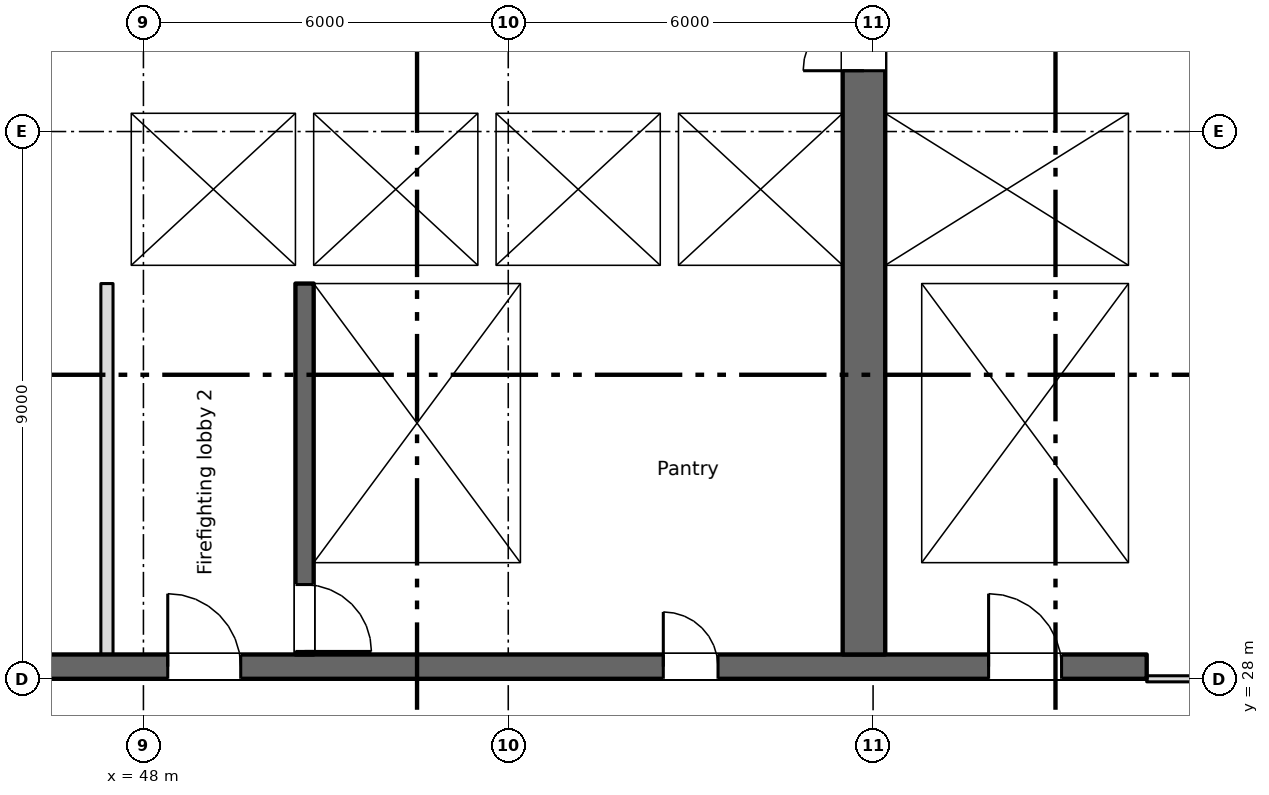
"""IFC4 building model, lengths in metres.
Left out: names, types, materials, properties, quantities, classifications, styles, units other than length and angle.
Written with IfcOpenShell. Run it as: python <this file> out.ifc"""

import sys

from ifc_helpers import new_model, si_unit, direction, frame, frame_2d, origin, place, context, subcontext, project, spatial, rectangle, extrude, element, fill, save


model = new_model("IFC4")
c1 = context("Model", 3, precision=1e-05, world=origin(), true_north=direction((0.0, 1.0)))
c2 = subcontext(c1, "Body", "Model", "MODEL_VIEW")
j1 = project(units=[si_unit("LENGTHUNIT", "METRE"), si_unit("PLANEANGLEUNIT", "RADIAN")], contexts=[c1])
p1 = place(None, origin())
s1 = spatial("IfcSite", under=j1, at=p1, CompositionType="ELEMENT")
p2 = place(p1, origin())
s2 = spatial("IfcBuilding", under=s1, at=p2, CompositionType="ELEMENT")
p3 = place(p2, frame((0.0, 0.0, 166.75)))
s3 = spatial("IfcBuildingStorey", under=s2, at=p3, CompositionType="ELEMENT", Elevation=166.75)
p4 = place(p3, frame((6.6, 28.2, 0.0), z_axis=(0.0, 0.0, 1.0), x_axis=(1.0, 0.0, 0.0)))
e1 = element("IfcWall", 1, at=p4, inside=s3, PredefinedType="SHEAR", context=c2, shape_type="SweptSolid", body=[
    extrude(rectangle(XDim=57.9, YDim=0.4, at=frame_2d((28.95, 0.0))), origin(), (0.0, 0.0, 1.0), 3.35),
])
p5 = place(p4, frame((12.663, 0.0, 0.0)))
e2 = element("IfcOpeningElement", 2, at=p5, cuts=e1, PredefinedType="OPENING", context=c2, shape_type="SweptSolid", body=[
    extrude(rectangle(XDim=0.9, YDim=2.1, at=frame_2d((0.45, 1.05))), frame((0.0, 0.21, 0.0), z_axis=(0.0, -1.0, 0.0), x_axis=(1.0, 0.0, 0.0)), (0.0, 0.0, 1.0), 0.42),
])
p6 = place(p4, frame((15.238, 0.0, 0.0)))
e3 = element("IfcOpeningElement", 3, at=p6, cuts=e1, PredefinedType="OPENING", context=c2, shape_type="SweptSolid", body=[
    extrude(rectangle(XDim=0.9, YDim=2.1, at=frame_2d((0.45, 1.05))), frame((0.0, 0.21, 0.0), z_axis=(0.0, -1.0, 0.0), x_axis=(1.0, 0.0, 0.0)), (0.0, 0.0, 1.0), 0.42),
])
p7 = place(p4, frame((49.95, 0.0, 0.0)))
e4 = element("IfcOpeningElement", 4, at=p7, cuts=e1, PredefinedType="OPENING", context=c2, shape_type="SweptSolid", body=[
    extrude(rectangle(XDim=0.9, YDim=2.1, at=frame_2d((0.45, 1.05))), frame((0.0, 0.21, 0.0), z_axis=(0.0, -1.0, 0.0), x_axis=(1.0, 0.0, 0.0)), (0.0, 0.0, 1.0), 0.42),
])
p8 = place(p4, frame((0.663, 0.0, 0.0)))
e5 = element("IfcOpeningElement", 5, at=p8, cuts=e1, PredefinedType="OPENING", context=c2, shape_type="SweptSolid", body=[
    extrude(rectangle(XDim=0.9, YDim=2.1, at=frame_2d((0.45, 1.05))), frame((0.0, 0.21, 0.0), z_axis=(0.0, -1.0, 0.0), x_axis=(1.0, 0.0, 0.0)), (0.0, 0.0, 1.0), 0.42),
])
p9 = place(p4, frame((2.238, 0.0, 0.0)))
e6 = element("IfcOpeningElement", 6, at=p9, cuts=e1, PredefinedType="OPENING", context=c2, shape_type="SweptSolid", body=[
    extrude(rectangle(XDim=0.9, YDim=2.1, at=frame_2d((0.45, 1.05))), frame((0.0, 0.21, 0.0), z_axis=(0.0, -1.0, 0.0), x_axis=(1.0, 0.0, 0.0)), (0.0, 0.0, 1.0), 0.42),
])
p10 = place(p4, frame((4.8, 0.0, 0.0)))
e7 = element("IfcOpeningElement", 7, at=p10, cuts=e1, PredefinedType="OPENING", context=c2, shape_type="SweptSolid", body=[
    extrude(rectangle(XDim=1.2, YDim=2.1, at=frame_2d((0.6, 1.05))), frame((0.0, 0.21, 0.0), z_axis=(0.0, -1.0, 0.0), x_axis=(1.0, 0.0, 0.0)), (0.0, 0.0, 1.0), 0.42),
])
p11 = place(p4, frame((31.8, 0.0, 0.0)))
e8 = element("IfcOpeningElement", 8, at=p11, cuts=e1, PredefinedType="OPENING", context=c2, shape_type="SweptSolid", body=[
    extrude(rectangle(XDim=1.2, YDim=2.1, at=frame_2d((0.6, 1.05))), frame((0.0, 0.21, 0.0), z_axis=(0.0, -1.0, 0.0), x_axis=(1.0, 0.0, 0.0)), (0.0, 0.0, 1.0), 0.42),
])
p12 = place(p4, frame((55.3, 0.0, 0.0)))
e9 = element("IfcOpeningElement", 9, at=p12, cuts=e1, PredefinedType="OPENING", context=c2, shape_type="SweptSolid", body=[
    extrude(rectangle(XDim=1.2, YDim=2.1, at=frame_2d((0.6, 1.05))), frame((0.0, 0.21, 0.0), z_axis=(0.0, -1.0, 0.0), x_axis=(1.0, 0.0, 0.0)), (0.0, 0.0, 1.0), 0.42),
])
p13 = place(p4, frame((21.8, 0.0, 0.0)))
e10 = element("IfcOpeningElement", 10, at=p13, cuts=e1, PredefinedType="OPENING", context=c2, shape_type="SweptSolid", body=[
    extrude(rectangle(XDim=1.2, YDim=2.1, at=frame_2d((0.6, 1.05))), frame((0.0, 0.21, 0.0), z_axis=(0.0, -1.0, 0.0), x_axis=(1.0, 0.0, 0.0)), (0.0, 0.0, 1.0), 0.42),
])
p14 = place(p4, frame((41.8, 0.0, 0.0)))
e11 = element("IfcOpeningElement", 11, at=p14, cuts=e1, PredefinedType="OPENING", context=c2, shape_type="SweptSolid", body=[
    extrude(rectangle(XDim=1.2, YDim=2.1, at=frame_2d((0.6, 1.05))), frame((0.0, 0.21, 0.0), z_axis=(0.0, -1.0, 0.0), x_axis=(1.0, 0.0, 0.0)), (0.0, 0.0, 1.0), 0.42),
])
p15 = place(p4, frame((24.95, 0.0, 0.0)))
e12 = element("IfcOpeningElement", 12, at=p15, cuts=e1, PredefinedType="OPENING", context=c2, shape_type="SweptSolid", body=[
    extrude(rectangle(XDim=2.4, YDim=2.1, at=frame_2d((1.2, 1.05))), frame((0.0, 0.21, 0.0), z_axis=(0.0, -1.0, 0.0), x_axis=(1.0, 0.0, 0.0)), (0.0, 0.0, 1.0), 0.42),
])
p16 = place(p4, frame((37.45, 0.0, 0.0)))
e13 = element("IfcOpeningElement", 13, at=p16, cuts=e1, PredefinedType="OPENING", context=c2, shape_type="SweptSolid", body=[
    extrude(rectangle(XDim=2.4, YDim=2.1, at=frame_2d((1.2, 1.05))), frame((0.0, 0.21, 0.0), z_axis=(0.0, -1.0, 0.0), x_axis=(1.0, 0.0, 0.0)), (0.0, 0.0, 1.0), 0.42),
])
p17 = place(p4, frame((8.1, 0.0, 0.0)))
e14 = element("IfcOpeningElement", 14, at=p17, cuts=e1, PredefinedType="OPENING", context=c2, shape_type="SweptSolid", body=[
    extrude(rectangle(XDim=2.4, YDim=2.1, at=frame_2d((1.2, 1.05))), frame((0.0, 0.21, 0.0), z_axis=(0.0, -1.0, 0.0), x_axis=(1.0, 0.0, 0.0)), (0.0, 0.0, 1.0), 0.42),
])
p18 = place(p4, frame((28.95, 0.0, 0.0)))
e15 = element("IfcOpeningElement", 15, at=p18, cuts=e1, PredefinedType="OPENING", context=c2, shape_type="SweptSolid", body=[
    extrude(rectangle(XDim=0.9, YDim=2.1, at=frame_2d((0.45, 1.05))), frame((0.0, 0.21, 0.0), z_axis=(0.0, -1.0, 0.0), x_axis=(1.0, 0.0, 0.0)), (0.0, 0.0, 1.0), 0.42),
])
p19 = place(p4, frame((34.95, 0.0, 0.0)))
e16 = element("IfcOpeningElement", 16, at=p19, cuts=e1, PredefinedType="OPENING", context=c2, shape_type="SweptSolid", body=[
    extrude(rectangle(XDim=0.9, YDim=2.1, at=frame_2d((0.45, 1.05))), frame((0.0, 0.21, 0.0), z_axis=(0.0, -1.0, 0.0), x_axis=(1.0, 0.0, 0.0)), (0.0, 0.0, 1.0), 0.42),
])
p20 = place(p3, frame((64.35, 34.8, 0.0), z_axis=(0.0, 0.0, 1.0), x_axis=(0.0, 1.0, 0.0)))
e17 = element("IfcWall", 17, at=p20, inside=s3, PredefinedType="SHEAR", context=c2, shape_type="SweptSolid", body=[
    extrude(rectangle(XDim=10.5, YDim=0.3, at=frame_2d((5.25, 0.0))), origin(), (0.0, 0.0, 1.0), 3.35),
])
p21 = place(p3, frame((59.85, 28.4, 0.0), z_axis=(0.0, 0.0, 1.0), x_axis=(0.0, 1.0, 0.0)))
e18 = element("IfcWall", 18, at=p21, inside=s3, PredefinedType="SHEAR", context=c2, shape_type="SweptSolid", body=[
    extrude(rectangle(XDim=16.9, YDim=0.7, at=frame_2d((8.45, 0.0))), origin(), (0.0, 0.0, 1.0), 3.35),
])
p22 = place(p21, frame((9.6, 0.0, 0.0)))
e19 = element("IfcOpeningElement", 19, at=p22, cuts=e18, PredefinedType="OPENING", context=c2, shape_type="SweptSolid", body=[
    extrude(rectangle(XDim=2.0, YDim=2.1, at=frame_2d((1.0, 1.05))), frame((0.0, 0.36, 0.0), z_axis=(0.0, -1.0, 0.0), x_axis=(1.0, 0.0, 0.0)), (0.0, 0.0, 1.0), 0.72),
])
p23 = place(p21, frame((15.4, 0.0, 0.0)))
e20 = element("IfcOpeningElement", 20, at=p23, cuts=e18, PredefinedType="OPENING", context=c2, shape_type="SweptSolid", body=[
    extrude(rectangle(XDim=1.2, YDim=2.1, at=frame_2d((0.6, 1.05))), frame((0.0, 0.36, 0.0), z_axis=(0.0, -1.0, 0.0), x_axis=(1.0, 0.0, 0.0)), (0.0, 0.0, 1.0), 0.72),
])
p24 = place(p3, frame((50.65, 34.5, 0.0), z_axis=(0.0, 0.0, 1.0), x_axis=(0.0, -1.0, 0.0)))
e21 = element("IfcWall", 21, at=p24, inside=s3, PredefinedType="SHEAR", context=c2, shape_type="SweptSolid", body=[
    extrude(rectangle(XDim=6.1, YDim=0.3, at=frame_2d((3.05, 0.0))), origin(), (0.0, 0.0, 1.0), 3.35),
])
p25 = place(p24, frame((4.95, 0.0, 0.0)))
e22 = element("IfcOpeningElement", 22, at=p25, cuts=e21, PredefinedType="OPENING", context=c2, shape_type="SweptSolid", body=[
    extrude(rectangle(XDim=1.1, YDim=2.1, at=frame_2d((0.55, 1.05))), frame((0.0, 0.16, 0.0), z_axis=(0.0, -1.0, 0.0), x_axis=(1.0, 0.0, 0.0)), (0.0, 0.0, 1.0), 0.32),
])
p26 = place(p3, frame((54.35, 28.4, 0.0), z_axis=(0.0, 0.0, 1.0), x_axis=(0.0, 1.0, 0.0)))
e23 = element("IfcWall", 23, at=p26, inside=s3, PredefinedType="SHEAR", context=c2, shape_type="SweptSolid", body=[
    extrude(rectangle(XDim=6.1, YDim=0.3, at=frame_2d((3.05, 0.0))), origin(), (0.0, 0.0, 1.0), 3.35),
])
p27 = place(p3, frame((60.5, 28.4, 0.0), z_axis=(0.0, 0.0, 1.0), x_axis=(0.0, 1.0, 0.0)))
e24 = element("IfcWall", 24, at=p27, inside=s3, PredefinedType="SHEAR", context=c2, shape_type="SweptSolid", body=[
    extrude(rectangle(XDim=6.1, YDim=0.6, at=frame_2d((3.05, 0.0))), origin(), (0.0, 0.0, 1.0), 3.35),
])
p28 = place(p3, frame((64.35, 28.4, 0.0), z_axis=(0.0, 0.0, 1.0), x_axis=(0.0, 1.0, 0.0)))
e25 = element("IfcWall", 25, at=p28, inside=s3, PredefinedType="SHEAR", context=c2, shape_type="SweptSolid", body=[
    extrude(rectangle(XDim=6.1, YDim=0.3, at=frame_2d((3.05, 0.0))), origin(), (0.0, 0.0, 1.0), 3.35),
])
p29 = place(p3, frame((47.3, 34.65, 0.0), z_axis=(0.0, 0.0, 1.0), x_axis=(1.0, 0.0, 0.0)))
e26 = element("IfcWall", 26, at=p29, inside=s3, PredefinedType="SHEAR", context=c2, shape_type="SweptSolid", body=[
    extrude(rectangle(XDim=12.2, YDim=0.3, at=frame_2d((6.1, 0.0))), origin(), (0.0, 0.0, 1.0), 3.35),
])
p30 = place(p29, frame((1.3, 0.0, 0.0)))
e27 = element("IfcOpeningElement", 27, at=p30, cuts=e26, PredefinedType="OPENING", context=c2, shape_type="SweptSolid", body=[
    extrude(rectangle(XDim=1.1, YDim=2.1, at=frame_2d((0.55, 1.05))), frame((0.0, 0.16, 0.0), z_axis=(0.0, -1.0, 0.0), x_axis=(1.0, 0.0, 0.0)), (0.0, 0.0, 1.0), 0.32),
])
p31 = place(p3, frame((60.2, 34.65, 0.0), z_axis=(0.0, 0.0, 1.0), x_axis=(1.0, 0.0, 0.0)))
e28 = element("IfcWall", 28, at=p31, inside=s3, PredefinedType="SHEAR", context=c2, shape_type="SweptSolid", body=[
    extrude(rectangle(XDim=4.3, YDim=0.3, at=frame_2d((2.15, 0.0))), origin(), (0.0, 0.0, 1.0), 3.35),
])
p32 = place(p3, frame((47.3, 37.45, 0.0), z_axis=(0.0, 0.0, 1.0), x_axis=(1.0, 0.0, 0.0)))
e29 = element("IfcWall", 29, at=p32, inside=s3, PredefinedType="SHEAR", context=c2, shape_type="SweptSolid", body=[
    extrude(rectangle(XDim=12.2, YDim=0.3, at=frame_2d((6.1, 0.0))), origin(), (0.0, 0.0, 1.0), 3.35),
])
p33 = place(p32, frame((4.3, 0.0, 0.0)))
e30 = element("IfcOpeningElement", 30, at=p33, cuts=e29, PredefinedType="OPENING", context=c2, shape_type="SweptSolid", body=[
    extrude(rectangle(XDim=1.1, YDim=2.1, at=frame_2d((0.55, 1.05))), frame((0.0, 0.16, 0.0), z_axis=(0.0, -1.0, 0.0), x_axis=(1.0, 0.0, 0.0)), (0.0, 0.0, 1.0), 0.32),
])
p34 = place(p32, frame((7.3, 0.0, 0.0)))
e31 = element("IfcOpeningElement", 31, at=p34, cuts=e29, PredefinedType="OPENING", context=c2, shape_type="SweptSolid", body=[
    extrude(rectangle(XDim=1.1, YDim=2.1, at=frame_2d((0.55, 1.05))), frame((0.0, 0.16, 0.0), z_axis=(0.0, -1.0, 0.0), x_axis=(1.0, 0.0, 0.0)), (0.0, 0.0, 1.0), 0.32),
])
p35 = place(p32, frame((10.3, 0.0, 0.0)))
e32 = element("IfcOpeningElement", 32, at=p35, cuts=e29, PredefinedType="OPENING", context=c2, shape_type="SweptSolid", body=[
    extrude(rectangle(XDim=1.1, YDim=2.1, at=frame_2d((0.55, 1.05))), frame((0.0, 0.16, 0.0), z_axis=(0.0, -1.0, 0.0), x_axis=(1.0, 0.0, 0.0)), (0.0, 0.0, 1.0), 0.32),
])
p36 = place(p3, frame((60.2, 37.45, 0.0), z_axis=(0.0, 0.0, 1.0), x_axis=(1.0, 0.0, 0.0)))
e33 = element("IfcWall", 33, at=p36, inside=s3, PredefinedType="SHEAR", context=c2, shape_type="SweptSolid", body=[
    extrude(rectangle(XDim=4.0, YDim=0.3, at=frame_2d((2.0, 0.0))), origin(), (0.0, 0.0, 1.0), 3.35),
])
p37 = place(p36, frame((1.45, 0.0, 0.0)))
e34 = element("IfcOpeningElement", 34, at=p37, cuts=e33, PredefinedType="OPENING", context=c2, shape_type="SweptSolid", body=[
    extrude(rectangle(XDim=1.1, YDim=2.1, at=frame_2d((0.55, 1.05))), frame((0.0, 0.16, 0.0), z_axis=(0.0, -1.0, 0.0), x_axis=(1.0, 0.0, 0.0)), (0.0, 0.0, 1.0), 0.32),
])
p38 = place(p3, frame((47.55, 34.8, 0.0), z_axis=(0.0, 0.0, 1.0), x_axis=(0.0, 1.0, 0.0)))
e35 = element("IfcWall", 35, at=p38, inside=s3, PredefinedType="SHEAR", context=c2, shape_type="SweptSolid", body=[
    extrude(rectangle(XDim=2.5, YDim=0.5, at=frame_2d((1.25, 0.0))), origin(), (0.0, 0.0, 1.0), 3.35),
])
for number, where, z_axis, x_axis in (
    (36, (50.65, 34.8, 0.0), (0.0, 0.0, 1.0), (0.0, 1.0, 0.0)),
    (37, (53.65, 34.8, 0.0), (0.0, 0.0, 1.0), (0.0, 1.0, 0.0)),
    (38, (56.65, 34.8, 0.0), (0.0, 0.0, 1.0), (0.0, 1.0, 0.0)),
):
    element("IfcWall", number, at=place(p3, frame(where, z_axis=z_axis, x_axis=x_axis)), inside=s3, PredefinedType="SHEAR", context=c2, shape_type="SweptSolid", body=[
        extrude(rectangle(XDim=2.5, YDim=0.3, at=frame_2d((1.25, 0.0))), origin(), (0.0, 0.0, 1.0), 3.35),
    ])
p39 = place(p3, frame((47.4, 28.4, 0.0), z_axis=(0.0, 0.0, 1.0), x_axis=(0.0, 1.0, 0.0)))
e39 = element("IfcWall", 39, at=p39, inside=s3, PredefinedType="PARTITIONING", context=c2, shape_type="SweptSolid", body=[
    extrude(rectangle(XDim=6.1, YDim=0.2, at=frame_2d((3.05, 0.0))), origin(), (0.0, 0.0, 1.0), 3.35),
])
p40 = place(p3, frame((64.5, 28.0, 0.0), z_axis=(0.0, 0.0, 1.0), x_axis=(1.0, 0.0, 0.0)))
e40 = element("IfcWall", 40, at=p40, inside=s3, PredefinedType="PARTITIONING", context=c2, shape_type="SweptSolid", body=[
    extrude(rectangle(XDim=6.9, YDim=0.1, at=frame_2d((3.45, 0.0))), origin(), (0.0, 0.0, 1.0), 3.35),
])
p41 = place(p40, frame((2.55, 0.0, 0.0)))
e41 = element("IfcOpeningElement", 41, at=p41, cuts=e40, PredefinedType="OPENING", context=c2, shape_type="SweptSolid", body=[
    extrude(rectangle(XDim=1.8, YDim=2.1, at=frame_2d((0.9, 1.05))), frame((0.0, 0.06, 0.0), z_axis=(0.0, -1.0, 0.0), x_axis=(1.0, 0.0, 0.0)), (0.0, 0.0, 1.0), 0.12),
])
p42 = place(p7, origin())
e42 = element("IfcDoor", 42, at=p42, inside=s3, OperationType="SINGLE_SWING_LEFT", PredefinedType="DOOR", context=c2, shape_type="SweptSolid", body=[
    extrude(rectangle(XDim=0.9, YDim=2.1, at=frame_2d((0.45, 1.05))), frame((0.0, 0.025, 0.0), z_axis=(0.0, -1.0, 0.0), x_axis=(1.0, 0.0, 0.0)), (0.0, 0.0, 1.0), 0.05),
])
fill(e4, e42)
p43 = place(p33, origin())
e43 = element("IfcDoor", 43, at=p43, inside=s3, OperationType="SLIDING_TO_LEFT", PredefinedType="DOOR", context=c2, shape_type="SweptSolid", body=[
    extrude(rectangle(XDim=1.1, YDim=2.1, at=frame_2d((0.55, 1.05))), frame((0.0, 0.025, 0.0), z_axis=(0.0, -1.0, 0.0), x_axis=(1.0, 0.0, 0.0)), (0.0, 0.0, 1.0), 0.05),
])
fill(e30, e43)
p44 = place(p34, origin())
e44 = element("IfcDoor", 44, at=p44, inside=s3, OperationType="SLIDING_TO_LEFT", PredefinedType="DOOR", context=c2, shape_type="SweptSolid", body=[
    extrude(rectangle(XDim=1.1, YDim=2.1, at=frame_2d((0.55, 1.05))), frame((0.0, 0.025, 0.0), z_axis=(0.0, -1.0, 0.0), x_axis=(1.0, 0.0, 0.0)), (0.0, 0.0, 1.0), 0.05),
])
fill(e31, e44)
p45 = place(p35, origin())
e45 = element("IfcDoor", 45, at=p45, inside=s3, OperationType="SLIDING_TO_LEFT", PredefinedType="DOOR", context=c2, shape_type="SweptSolid", body=[
    extrude(rectangle(XDim=1.1, YDim=2.1, at=frame_2d((0.55, 1.05))), frame((0.0, 0.025, 0.0), z_axis=(0.0, -1.0, 0.0), x_axis=(1.0, 0.0, 0.0)), (0.0, 0.0, 1.0), 0.05),
])
fill(e32, e45)
p46 = place(p37, origin())
e46 = element("IfcDoor", 46, at=p46, inside=s3, OperationType="SLIDING_TO_LEFT", PredefinedType="DOOR", context=c2, shape_type="SweptSolid", body=[
    extrude(rectangle(XDim=1.1, YDim=2.1, at=frame_2d((0.55, 1.05))), frame((0.0, 0.025, 0.0), z_axis=(0.0, -1.0, 0.0), x_axis=(1.0, 0.0, 0.0)), (0.0, 0.0, 1.0), 0.05),
])
fill(e34, e46)
p47 = place(p30, origin())
e47 = element("IfcDoor", 47, at=p47, inside=s3, OperationType="SLIDING_TO_LEFT", PredefinedType="DOOR", context=c2, shape_type="SweptSolid", body=[
    extrude(rectangle(XDim=1.1, YDim=2.1, at=frame_2d((0.55, 1.05))), frame((0.0, 0.025, 0.0), z_axis=(0.0, -1.0, 0.0), x_axis=(1.0, 0.0, 0.0)), (0.0, 0.0, 1.0), 0.05),
])
fill(e27, e47)
p48 = place(p25, origin())
e48 = element("IfcDoor", 48, at=p48, inside=s3, OperationType="SINGLE_SWING_RIGHT", PredefinedType="DOOR", context=c2, shape_type="SweptSolid", body=[
    extrude(rectangle(XDim=1.1, YDim=2.1, at=frame_2d((0.55, 1.05))), frame((0.0, 0.025, 0.0), z_axis=(0.0, -1.0, 0.0), x_axis=(1.0, 0.0, 0.0)), (0.0, 0.0, 1.0), 0.05),
])
fill(e22, e48)
p49 = place(p12, origin())
e49 = element("IfcDoor", 49, at=p49, inside=s3, OperationType="SINGLE_SWING_LEFT", PredefinedType="DOOR", context=c2, shape_type="SweptSolid", body=[
    extrude(rectangle(XDim=1.2, YDim=2.1, at=frame_2d((0.6, 1.05))), frame((0.0, 0.025, 0.0), z_axis=(0.0, -1.0, 0.0), x_axis=(1.0, 0.0, 0.0)), (0.0, 0.0, 1.0), 0.05),
])
fill(e9, e49)
p50 = place(p14, origin())
e50 = element("IfcDoor", 50, at=p50, inside=s3, OperationType="SINGLE_SWING_LEFT", PredefinedType="DOOR", context=c2, shape_type="SweptSolid", body=[
    extrude(rectangle(XDim=1.2, YDim=2.1, at=frame_2d((0.6, 1.05))), frame((0.0, 0.025, 0.0), z_axis=(0.0, -1.0, 0.0), x_axis=(1.0, 0.0, 0.0)), (0.0, 0.0, 1.0), 0.05),
])
fill(e11, e50)
p51 = place(p22, origin())
e51 = element("IfcDoor", 51, at=p51, inside=s3, OperationType="DOUBLE_DOOR_SINGLE_SWING", PredefinedType="DOOR", context=c2, shape_type="SweptSolid", body=[
    extrude(rectangle(XDim=2.0, YDim=2.1, at=frame_2d((1.0, 1.05))), frame((0.0, 0.025, 0.0), z_axis=(0.0, -1.0, 0.0), x_axis=(1.0, 0.0, 0.0)), (0.0, 0.0, 1.0), 0.05),
])
fill(e19, e51)
save(model, sys.argv[1])
